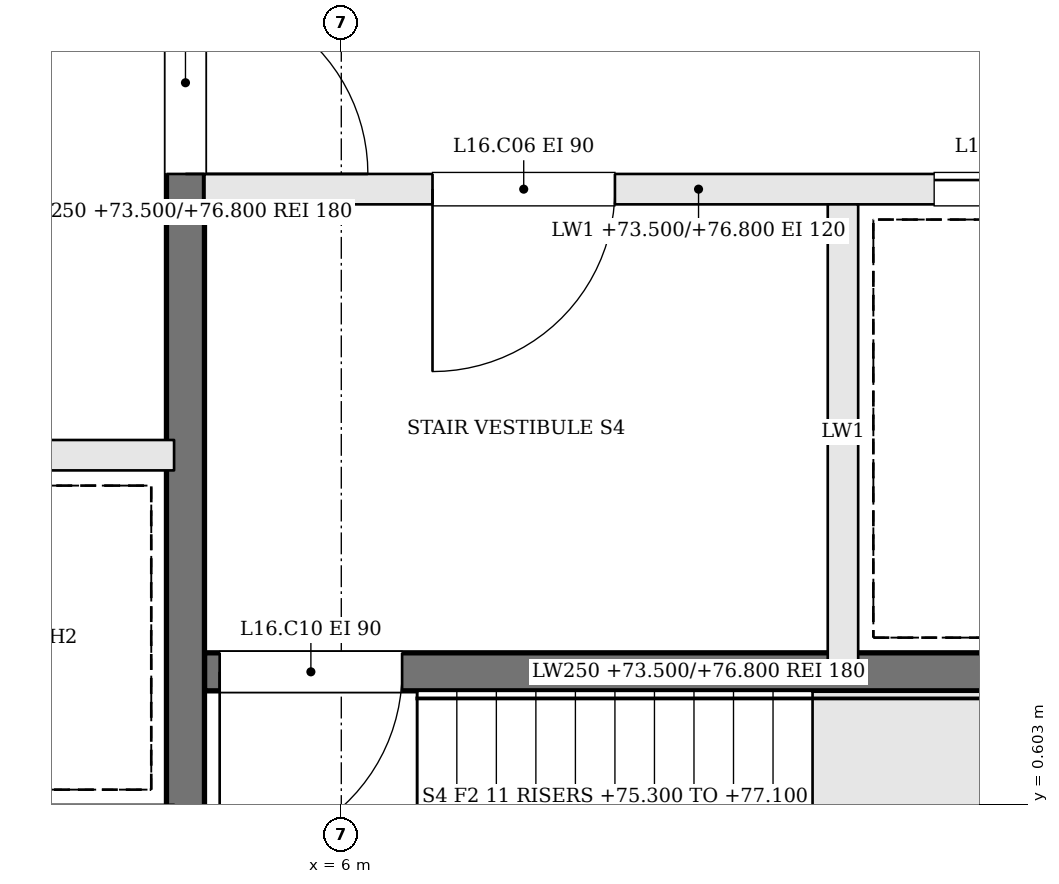
"""IFC4 building model, lengths in metres.
Left out: names, types, materials, properties, quantities, classifications, styles, units other than length and angle.
Written with IfcOpenShell. Run it as: python <this file> out.ifc"""

import sys

from ifc_helpers import new_model, si_unit, direction, frame, frame_2d, origin, place, context, subcontext, project, spatial, rectangle, extrude, element, fill, save


model = new_model("IFC4")
c1 = context("Model", 3, precision=1e-05, world=origin(), true_north=direction((0.0, 1.0)))
c2 = subcontext(c1, "Body", "Model", "MODEL_VIEW")
j1 = project(units=[si_unit("LENGTHUNIT", "METRE"), si_unit("PLANEANGLEUNIT", "RADIAN")], contexts=[c1])
p1 = place(None, origin())
s1 = spatial("IfcSite", under=j1, at=p1, CompositionType="ELEMENT")
p2 = place(p1, origin())
s2 = spatial("IfcBuilding", under=s1, at=p2, CompositionType="ELEMENT")
p3 = place(p2, frame((0.0, 0.0, 73.5)))
s3 = spatial("IfcBuildingStorey", under=s2, at=p3, CompositionType="ELEMENT", Elevation=73.5)
p4 = place(p3, frame((11.6, 4.65, 0.0), z_axis=(0.0, 0.0, 1.0), x_axis=(-1.0, 0.0, 0.0)))
e1 = element("IfcWall", 1, at=p4, inside=s3, PredefinedType="SOLIDWALL", context=c2, shape_type="SweptSolid", body=[
    extrude(rectangle(XDim=6.5, YDim=0.2, at=frame_2d((3.25, 0.0))), origin(), (0.0, 0.0, 1.0), 3.3),
])
p5 = place(p4, frame((3.8, 0.0, 0.0)))
e2 = element("IfcOpeningElement", 2, at=p5, cuts=e1, PredefinedType="OPENING", context=c2, shape_type="SweptSolid", body=[
    extrude(rectangle(XDim=1.2, YDim=2.1, at=frame_2d((0.6, 1.05))), frame((0.0, 0.11, 0.0), z_axis=(0.0, -1.0, 0.0), x_axis=(1.0, 0.0, 0.0)), (0.0, 0.0, 1.0), 0.22),
])
p6 = place(p4, frame((0.5, 0.0, 0.0)))
e3 = element("IfcOpeningElement", 3, at=p6, cuts=e1, PredefinedType="OPENING", context=c2, shape_type="SweptSolid", body=[
    extrude(rectangle(XDim=1.2, YDim=2.1, at=frame_2d((0.6, 1.05))), frame((0.0, 0.11, 0.0), z_axis=(0.0, -1.0, 0.0), x_axis=(1.0, 0.0, 0.0)), (0.0, 0.0, 1.0), 0.22),
])
p7 = place(p3, frame((11.6, 1.475, 0.0), z_axis=(0.0, 0.0, 1.0), x_axis=(-1.0, 0.0, 0.0)))
e4 = element("IfcWall", 4, at=p7, inside=s3, PredefinedType="SOLIDWALL", context=c2, shape_type="SweptSolid", body=[
    extrude(rectangle(XDim=6.5, YDim=0.25, at=frame_2d((3.25, 0.0))), origin(), (0.0, 0.0, 1.0), 3.3),
])
p8 = place(p7, frame((5.2, 0.0, 0.0)))
e5 = element("IfcOpeningElement", 5, at=p8, cuts=e4, PredefinedType="OPENING", context=c2, shape_type="SweptSolid", body=[
    extrude(rectangle(XDim=1.2, YDim=2.1, at=frame_2d((0.6, 1.05))), frame((0.0, 0.135, 0.0), z_axis=(0.0, -1.0, 0.0), x_axis=(1.0, 0.0, 0.0)), (0.0, 0.0, 1.0), 0.27),
])
p9 = place(p3, frame((9.3, 4.55, 0.0), z_axis=(0.0, 0.0, 1.0), x_axis=(0.0, -1.0, 0.0)))
e6 = element("IfcWall", 6, at=p9, inside=s3, PredefinedType="SOLIDWALL", context=c2, shape_type="SweptSolid", body=[
    extrude(rectangle(XDim=3.0, YDim=0.2, at=frame_2d((1.5, 0.0))), origin(), (0.0, 0.0, 1.0), 3.3),
])
p10 = place(p3, frame((4.975, 10.6, 0.0), z_axis=(0.0, 0.0, 1.0), x_axis=(0.0, -1.0, 0.0)))
e7 = element("IfcWall", 7, at=p10, inside=s3, PredefinedType="SOLIDWALL", context=c2, shape_type="SweptSolid", body=[
    extrude(rectangle(XDim=12.2, YDim=0.25, at=frame_2d((6.1, 0.0))), origin(), (0.0, 0.0, 1.0), 3.3),
])
p11 = place(p10, frame((4.65, 0.0, 0.0)))
e8 = element("IfcOpeningElement", 8, at=p11, cuts=e7, PredefinedType="OPENING", context=c2, shape_type="SweptSolid", body=[
    extrude(rectangle(XDim=1.2, YDim=2.1, at=frame_2d((0.6, 1.05))), frame((0.0, 0.135, 0.0), z_axis=(0.0, -1.0, 0.0), x_axis=(1.0, 0.0, 0.0)), (0.0, 0.0, 1.0), 0.27),
])
p12 = place(p3, frame((-4.9, 2.9, 0.0), z_axis=(0.0, 0.0, 1.0), x_axis=(1.0, 0.0, 0.0)))
e9 = element("IfcWall", 9, at=p12, inside=s3, PredefinedType="SOLIDWALL", context=c2, shape_type="SweptSolid", body=[
    extrude(rectangle(XDim=9.8, YDim=0.2, at=frame_2d((4.9, 0.0))), origin(), (0.0, 0.0, 1.0), 3.3),
])
p13 = place(p12, frame((0.675, 0.0, 0.0)))
e10 = element("IfcOpeningElement", 10, at=p13, cuts=e9, PredefinedType="OPENING", context=c2, shape_type="SweptSolid", body=[
    extrude(rectangle(XDim=1.1, YDim=2.1, at=frame_2d((0.55, 1.05))), frame((0.0, 0.11, 0.0), z_axis=(0.0, -1.0, 0.0), x_axis=(1.0, 0.0, 0.0)), (0.0, 0.0, 1.0), 0.22),
])
p14 = place(p12, frame((3.125, 0.0, 0.0)))
e11 = element("IfcOpeningElement", 11, at=p14, cuts=e9, PredefinedType="OPENING", context=c2, shape_type="SweptSolid", body=[
    extrude(rectangle(XDim=1.1, YDim=2.1, at=frame_2d((0.55, 1.05))), frame((0.0, 0.11, 0.0), z_axis=(0.0, -1.0, 0.0), x_axis=(1.0, 0.0, 0.0)), (0.0, 0.0, 1.0), 0.22),
])
p15 = place(p11, origin())
e12 = element("IfcDoor", 12, at=p15, inside=s3, OperationType="SINGLE_SWING_RIGHT", PredefinedType="DOOR", context=c2, shape_type="SweptSolid", body=[
    extrude(rectangle(XDim=1.2, YDim=2.1, at=frame_2d((0.6, 1.05))), frame((0.0, 0.025, 0.0), z_axis=(0.0, -1.0, 0.0), x_axis=(1.0, 0.0, 0.0)), (0.0, 0.0, 1.0), 0.05),
])
fill(e8, e12)
p16 = place(p5, origin())
e13 = element("IfcDoor", 13, at=p16, inside=s3, OperationType="SINGLE_SWING_RIGHT", PredefinedType="DOOR", context=c2, shape_type="SweptSolid", body=[
    extrude(rectangle(XDim=1.2, YDim=2.1, at=frame_2d((0.6, 1.05))), frame((0.0, 0.025, 0.0), z_axis=(0.0, -1.0, 0.0), x_axis=(1.0, 0.0, 0.0)), (0.0, 0.0, 1.0), 0.05),
])
fill(e2, e13)
p17 = place(p8, origin())
e14 = element("IfcDoor", 14, at=p17, inside=s3, OperationType="SINGLE_SWING_RIGHT", PredefinedType="DOOR", context=c2, shape_type="SweptSolid", body=[
    extrude(rectangle(XDim=1.2, YDim=2.1, at=frame_2d((0.6, 1.05))), frame((0.0, 0.025, 0.0), z_axis=(0.0, -1.0, 0.0), x_axis=(1.0, 0.0, 0.0)), (0.0, 0.0, 1.0), 0.05),
])
fill(e5, e14)
p18 = place(p6, origin())
e15 = element("IfcDoor", 15, at=p18, inside=s3, OperationType="SLIDING_TO_RIGHT", PredefinedType="DOOR", context=c2, shape_type="SweptSolid", body=[
    extrude(rectangle(XDim=1.2, YDim=2.1, at=frame_2d((0.6, 1.05))), frame((0.0, 0.025, 0.0), z_axis=(0.0, -1.0, 0.0), x_axis=(1.0, 0.0, 0.0)), (0.0, 0.0, 1.0), 0.05),
])
fill(e3, e15)
save(model, sys.argv[1])
